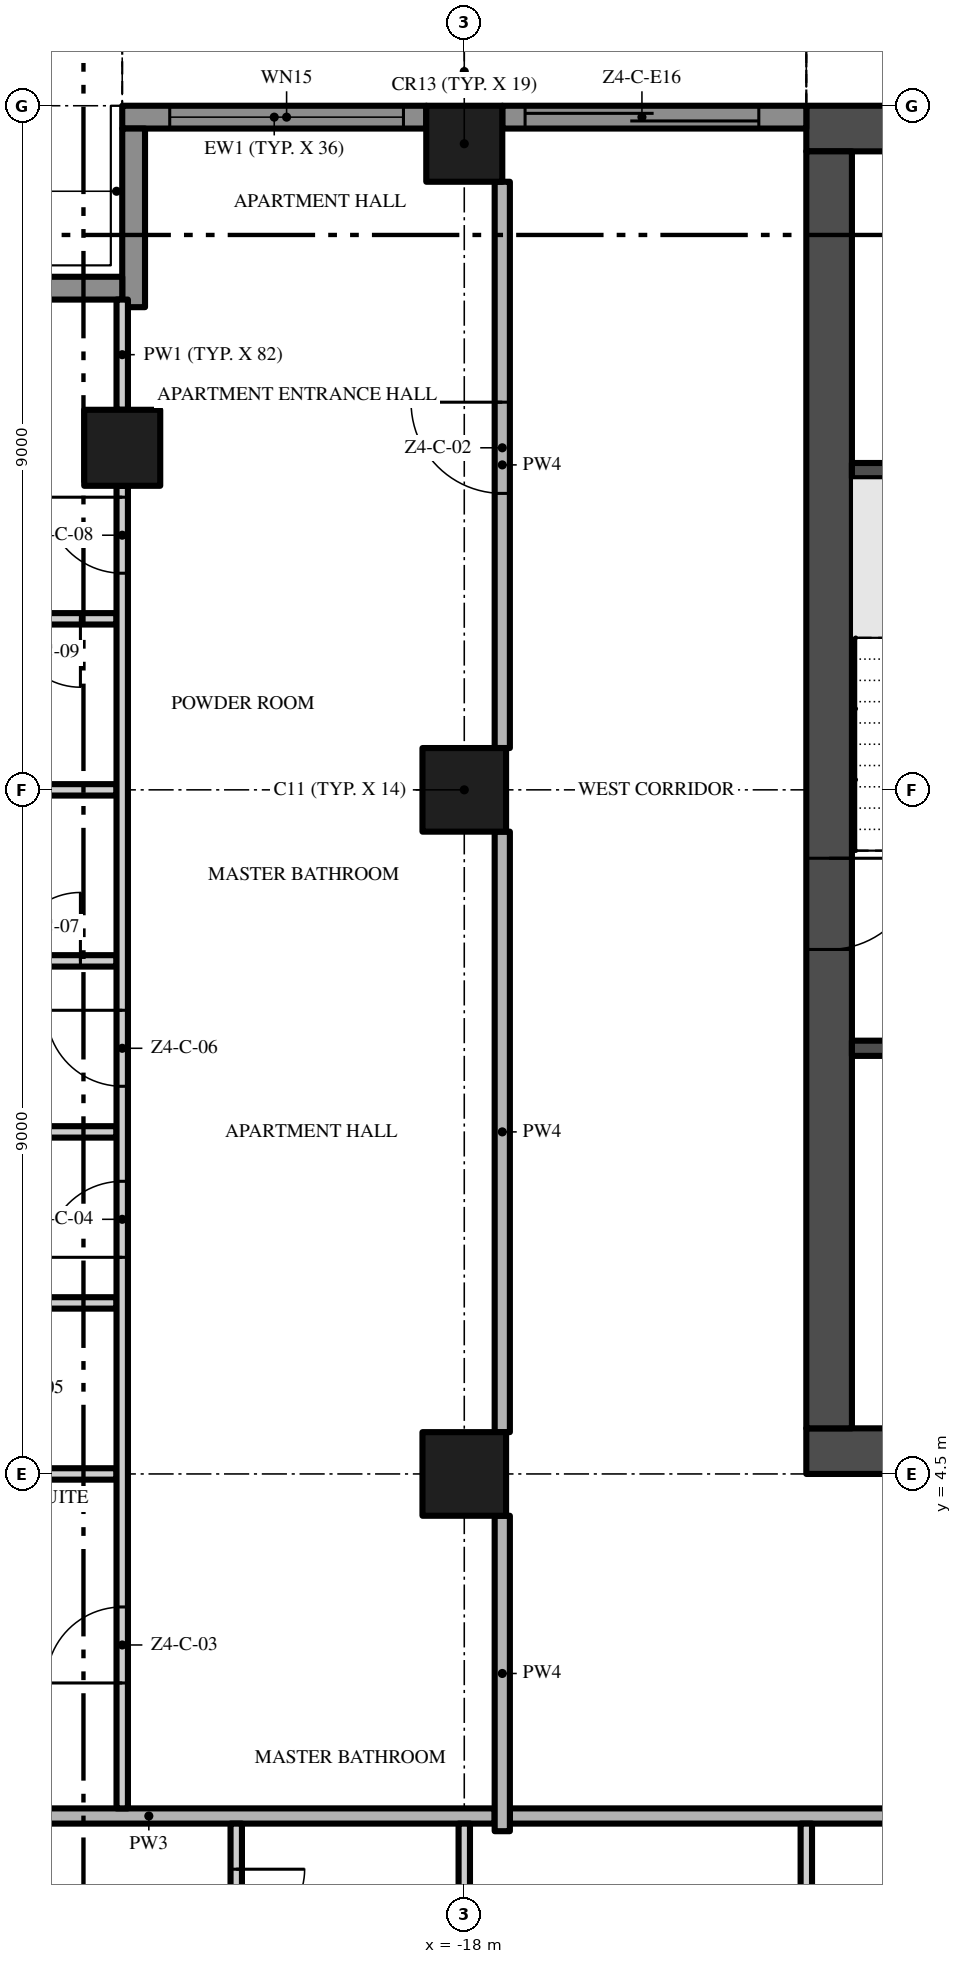
"""IFC4 building model, lengths in metres.
Left out: names, types, materials, properties, quantities, classifications, styles, units other than length and angle.
Written with IfcOpenShell. Run it as: python <this file> out.ifc"""

import sys

from ifc_helpers import new_model, si_unit, direction, frame, frame_2d, origin, origin_2d, place, context, subcontext, project, spatial, rectangle, extrude, element, fill, save


model = new_model("IFC4")
c1 = context("Model", 3, precision=1e-05, world=origin(), true_north=direction((0.0, 1.0)))
c2 = subcontext(c1, "Body", "Model", "MODEL_VIEW")
j1 = project(units=[si_unit("LENGTHUNIT", "METRE"), si_unit("PLANEANGLEUNIT", "RADIAN")], contexts=[c1])
p1 = place(None, origin())
s1 = spatial("IfcSite", under=j1, at=p1, CompositionType="ELEMENT")
p2 = place(p1, origin())
s2 = spatial("IfcBuilding", under=s1, at=p2, CompositionType="ELEMENT")
p3 = place(p2, frame((0.0, 0.0, 211.0)))
s3 = spatial("IfcBuildingStorey", under=s2, at=p3, CompositionType="ELEMENT", Elevation=211.0)
p4 = place(p3, frame((-13.5, 4.8, -0.3), z_axis=(0.0, 0.0, 1.0), x_axis=(1.0, 0.0, 0.0)))
e1 = element("IfcWall", 1, at=p4, inside=s3, PredefinedType="SHEAR", context=c2, shape_type="SweptSolid", body=[
    extrude(rectangle(XDim=27.0, YDim=0.6, at=frame_2d((13.5, 0.0))), origin(), (0.0, 0.0, 1.0), 3.8),
])
p5 = place(p4, frame((12.0, 0.0, 0.3)))
e2 = element("IfcOpeningElement", 2, at=p5, cuts=e1, PredefinedType="OPENING", context=c2, shape_type="SweptSolid", body=[
    extrude(rectangle(XDim=3.0, YDim=2.4, at=frame_2d((1.5, 1.2))), frame((0.0, 0.31, 0.0), z_axis=(0.0, -1.0, 0.0), x_axis=(1.0, 0.0, 0.0)), (0.0, 0.0, 1.0), 0.62),
])
p6 = place(p4, frame((4.9, 0.0, 0.3)))
e3 = element("IfcOpeningElement", 3, at=p6, cuts=e1, PredefinedType="OPENING", context=c2, shape_type="SweptSolid", body=[
    extrude(rectangle(XDim=1.2, YDim=2.2, at=frame_2d((0.6, 1.1))), frame((0.0, 0.31, 0.0), z_axis=(0.0, -1.0, 0.0), x_axis=(1.0, 0.0, 0.0)), (0.0, 0.0, 1.0), 0.62),
])
p7 = place(p4, frame((20.75, 0.0, 0.3)))
e4 = element("IfcOpeningElement", 4, at=p7, cuts=e1, PredefinedType="OPENING", context=c2, shape_type="SweptSolid", body=[
    extrude(rectangle(XDim=1.5, YDim=2.2, at=frame_2d((0.75, 1.1))), frame((0.0, 0.31, 0.0), z_axis=(0.0, -1.0, 0.0), x_axis=(1.0, 0.0, 0.0)), (0.0, 0.0, 1.0), 0.62),
])
p8 = place(p4, frame((17.4, 0.0, 0.3)))
e5 = element("IfcOpeningElement", 5, at=p8, cuts=e1, PredefinedType="OPENING", context=c2, shape_type="SweptSolid", body=[
    extrude(rectangle(XDim=1.2, YDim=2.2, at=frame_2d((0.6, 1.1))), frame((0.0, 0.31, 0.0), z_axis=(0.0, -1.0, 0.0), x_axis=(1.0, 0.0, 0.0)), (0.0, 0.0, 1.0), 0.62),
])
p9 = place(p3, frame((13.5, 22.2, -0.3), z_axis=(0.0, 0.0, 1.0), x_axis=(-1.0, 0.0, 0.0)))
e6 = element("IfcWall", 6, at=p9, inside=s3, PredefinedType="SHEAR", context=c2, shape_type="SweptSolid", body=[
    extrude(rectangle(XDim=27.0, YDim=0.6, at=frame_2d((13.5, 0.0))), origin(), (0.0, 0.0, 1.0), 3.8),
])
p10 = place(p3, frame((-13.2, 21.9, -0.3), z_axis=(0.0, 0.0, 1.0), x_axis=(0.0, -1.0, 0.0)))
e7 = element("IfcWall", 7, at=p10, inside=s3, PredefinedType="SHEAR", context=c2, shape_type="SweptSolid", body=[
    extrude(rectangle(XDim=16.8, YDim=0.6, at=frame_2d((8.4, 0.0))), origin(), (0.0, 0.0, 1.0), 3.8),
])
p11 = place(p10, frame((9.3, 0.0, 0.3)))
e8 = element("IfcOpeningElement", 8, at=p11, cuts=e7, PredefinedType="OPENING", context=c2, shape_type="SweptSolid", body=[
    extrude(rectangle(XDim=1.2, YDim=2.2, at=frame_2d((0.6, 1.1))), frame((0.0, 0.31, 0.0), z_axis=(0.0, -1.0, 0.0), x_axis=(1.0, 0.0, 0.0)), (0.0, 0.0, 1.0), 0.62),
])
p12 = place(p3, frame((-18.0, 13.5, 0.0), z_axis=(0.0, 0.0, 1.0), x_axis=(1.0, 0.0, 0.0)))
e9 = element("IfcColumn", 9, at=p12, inside=s3, PredefinedType="COLUMN", context=c2, shape_type="SweptSolid", body=[
    extrude(rectangle(XDim=1.1, YDim=1.1, at=origin_2d()), origin(), (0.0, 0.0, 1.0), 3.5),
])
p13 = place(p3, frame((-18.0, 22.0, 0.0), z_axis=(0.0, 0.0, 1.0), x_axis=(1.0, 0.0, 0.0)))
e10 = element("IfcColumn", 10, at=p13, inside=s3, PredefinedType="COLUMN", context=c2, shape_type="SweptSolid", body=[
    extrude(rectangle(XDim=1.0, YDim=1.0, at=origin_2d()), origin(), (0.0, 0.0, 1.0), 3.5),
])
p14 = place(p3, frame((-18.0, 4.5, 0.0), z_axis=(0.0, 0.0, 1.0), x_axis=(1.0, 0.0, 0.0)))
e11 = element("IfcColumn", 11, at=p14, inside=s3, PredefinedType="COLUMN", context=c2, shape_type="SweptSolid", body=[
    extrude(rectangle(XDim=1.1, YDim=1.1, at=origin_2d()), origin(), (0.0, 0.0, 1.0), 3.5),
])
p15 = place(p3, frame((-22.5, 18.0, 0.0), z_axis=(0.0, 0.0, 1.0), x_axis=(1.0, 0.0, 0.0)))
e12 = element("IfcColumn", 12, at=p15, inside=s3, PredefinedType="COLUMN", context=c2, shape_type="SweptSolid", body=[
    extrude(rectangle(XDim=1.0, YDim=1.0, at=origin_2d()), origin(), (0.0, 0.0, 1.0), 3.5),
])
p16 = place(p3, frame((-17.5, 22.35, 0.0), z_axis=(0.0, 0.0, 1.0), x_axis=(1.0, 0.0, 0.0)))
e13 = element("IfcWall", 13, at=p16, inside=s3, PredefinedType="SOLIDWALL", context=c2, shape_type="SweptSolid", body=[
    extrude(rectangle(XDim=4.0, YDim=0.3, at=frame_2d((2.0, 0.0))), origin(), (0.0, 0.0, 1.0), 3.5),
])
p17 = place(p16, frame((0.3, 0.0, 0.0)))
e14 = element("IfcOpeningElement", 14, at=p17, cuts=e13, PredefinedType="OPENING", context=c2, shape_type="SweptSolid", body=[
    extrude(rectangle(XDim=3.075, YDim=2.4, at=frame_2d((1.538, 1.2))), frame((0.0, 0.16, 0.0), z_axis=(0.0, -1.0, 0.0), x_axis=(1.0, 0.0, 0.0)), (0.0, 0.0, 1.0), 0.32),
])
p18 = place(p3, frame((-22.5, 22.35, 0.0), z_axis=(0.0, 0.0, 1.0), x_axis=(1.0, 0.0, 0.0)))
e15 = element("IfcWall", 15, at=p18, inside=s3, PredefinedType="SOLIDWALL", context=c2, shape_type="SweptSolid", body=[
    extrude(rectangle(XDim=4.0, YDim=0.3, at=frame_2d((2.0, 0.0))), origin(), (0.0, 0.0, 1.0), 3.5),
])
p19 = place(p18, frame((0.625, 0.0, 0.45)))
e16 = element("IfcOpeningElement", 16, at=p19, cuts=e15, PredefinedType="OPENING", context=c2, shape_type="SweptSolid", body=[
    extrude(rectangle(XDim=3.075, YDim=2.65, at=frame_2d((1.538, 1.325))), frame((0.0, 0.16, 0.0), z_axis=(0.0, -1.0, 0.0), x_axis=(1.0, 0.0, 0.0)), (0.0, 0.0, 1.0), 0.32),
])
p20 = place(p3, frame((-22.35, 19.85, 0.0), z_axis=(0.0, 0.0, 1.0), x_axis=(0.0, 1.0, 0.0)))
e17 = element("IfcWall", 17, at=p20, inside=s3, PredefinedType="SOLIDWALL", context=c2, shape_type="SweptSolid", body=[
    extrude(rectangle(XDim=2.35, YDim=0.3, at=frame_2d((1.175, 0.0))), origin(), (0.0, 0.0, 1.0), 3.5),
])
p21 = place(p3, frame((-24.75, 20.1, 0.0), z_axis=(0.0, 0.0, 1.0), x_axis=(1.0, 0.0, 0.0)))
e18 = element("IfcWall", 18, at=p21, inside=s3, PredefinedType="SOLIDWALL", context=c2, shape_type="SweptSolid", body=[
    extrude(rectangle(XDim=2.25, YDim=0.3, at=frame_2d((1.125, 0.0))), origin(), (0.0, 0.0, 1.0), 3.5),
])
for number, where, z_axis, x_axis in (
    (19, (-12.9, 10.1, 0.0), (0.0, 0.0, 1.0), (1.0, 0.0, 0.0)),
    (20, (-12.9, 17.7, 0.0), (0.0, 0.0, 1.0), (1.0, 0.0, 0.0)),
):
    element("IfcWall", number, at=place(p3, frame(where, z_axis=z_axis, x_axis=x_axis)), inside=s3, PredefinedType="SHEAR", context=c2, shape_type="SweptSolid", body=[
        extrude(rectangle(XDim=3.25, YDim=0.2, at=frame_2d((1.625, 0.0))), origin(), (0.0, 0.0, 1.0), 3.5),
    ])
p22 = place(p3, frame((-17.4, 0.0, 0.0), z_axis=(0.0, 0.0, 1.0), x_axis=(1.0, 0.0, 0.0)))
e21 = element("IfcWall", 21, at=p22, inside=s3, PredefinedType="PARTITIONING", context=c2, shape_type="SweptSolid", body=[
    extrude(rectangle(XDim=12.8, YDim=0.2, at=frame_2d((6.4, 0.0))), origin(), (0.0, 0.0, 1.0), 3.5),
])
p23 = place(p3, frame((-26.7, 0.0, 0.0), z_axis=(0.0, 0.0, 1.0), x_axis=(1.0, 0.0, 0.0)))
e22 = element("IfcWall", 22, at=p23, inside=s3, PredefinedType="PARTITIONING", context=c2, shape_type="SweptSolid", body=[
    extrude(rectangle(XDim=9.1, YDim=0.2, at=frame_2d((4.55, 0.0))), origin(), (0.0, 0.0, 1.0), 3.5),
])
p24 = place(p3, frame((-26.0, 4.5, 0.0), z_axis=(0.0, 0.0, 1.0), x_axis=(1.0, 0.0, 0.0)))
e23 = element("IfcWall", 23, at=p24, inside=s3, PredefinedType="PARTITIONING", context=c2, shape_type="SweptSolid", body=[
    extrude(rectangle(XDim=3.425, YDim=0.15, at=frame_2d((1.712, 0.0))), origin(), (0.0, 0.0, 1.0), 3.5),
])
p25 = place(p3, frame((-24.45, 6.75, 0.0), z_axis=(0.0, 0.0, 1.0), x_axis=(1.0, 0.0, 0.0)))
e24 = element("IfcWall", 24, at=p25, inside=s3, PredefinedType="PARTITIONING", context=c2, shape_type="SweptSolid", body=[
    extrude(rectangle(XDim=1.875, YDim=0.15, at=frame_2d((0.938, 0.0))), origin(), (0.0, 0.0, 1.0), 3.5),
])
p26 = place(p3, frame((-26.7, 9.0, 0.0), z_axis=(0.0, 0.0, 1.0), x_axis=(1.0, 0.0, 0.0)))
e25 = element("IfcWall", 25, at=p26, inside=s3, PredefinedType="PARTITIONING", context=c2, shape_type="SweptSolid", body=[
    extrude(rectangle(XDim=4.125, YDim=0.15, at=frame_2d((2.062, 0.0))), origin(), (0.0, 0.0, 1.0), 3.5),
])
p27 = place(p3, frame((-24.45, 11.25, 0.0), z_axis=(0.0, 0.0, 1.0), x_axis=(1.0, 0.0, 0.0)))
e26 = element("IfcWall", 26, at=p27, inside=s3, PredefinedType="PARTITIONING", context=c2, shape_type="SweptSolid", body=[
    extrude(rectangle(XDim=1.875, YDim=0.15, at=frame_2d((0.938, 0.0))), origin(), (0.0, 0.0, 1.0), 3.5),
])
p28 = place(p27, frame((0.5, 0.0, 0.0)))
e27 = element("IfcOpeningElement", 27, at=p28, cuts=e26, PredefinedType="OPENING", context=c2, shape_type="SweptSolid", body=[
    extrude(rectangle(XDim=0.9, YDim=2.1, at=frame_2d((0.45, 1.05))), frame((0.0, 0.085, 0.0), z_axis=(0.0, -1.0, 0.0), x_axis=(1.0, 0.0, 0.0)), (0.0, 0.0, 1.0), 0.17),
])
p29 = place(p3, frame((-24.45, 13.5, 0.0), z_axis=(0.0, 0.0, 1.0), x_axis=(1.0, 0.0, 0.0)))
e28 = element("IfcWall", 28, at=p29, inside=s3, PredefinedType="PARTITIONING", context=c2, shape_type="SweptSolid", body=[
    extrude(rectangle(XDim=1.875, YDim=0.15, at=frame_2d((0.938, 0.0))), origin(), (0.0, 0.0, 1.0), 3.5),
])
p30 = place(p3, frame((-22.575, 15.75, 0.0), z_axis=(0.0, 0.0, 1.0), x_axis=(-1.0, 0.0, 0.0)))
e29 = element("IfcWall", 29, at=p30, inside=s3, PredefinedType="PARTITIONING", context=c2, shape_type="SweptSolid", body=[
    extrude(rectangle(XDim=1.875, YDim=0.15, at=frame_2d((0.938, 0.0))), origin(), (0.0, 0.0, 1.0), 3.5),
])
p31 = place(p30, frame((0.475, 0.0, 0.0)))
e30 = element("IfcOpeningElement", 30, at=p31, cuts=e29, PredefinedType="OPENING", context=c2, shape_type="SweptSolid", body=[
    extrude(rectangle(XDim=0.9, YDim=2.1, at=frame_2d((0.45, 1.05))), frame((0.0, 0.085, 0.0), z_axis=(0.0, -1.0, 0.0), x_axis=(1.0, 0.0, 0.0)), (0.0, 0.0, 1.0), 0.17),
])
p32 = place(p3, frame((-22.5, 0.1, 0.0), z_axis=(0.0, 0.0, 1.0), x_axis=(0.0, 1.0, 0.0)))
e31 = element("IfcWall", 31, at=p32, inside=s3, PredefinedType="PARTITIONING", context=c2, shape_type="SweptSolid", body=[
    extrude(rectangle(XDim=17.4, YDim=0.15, at=frame_2d((8.7, 0.0))), origin(), (0.0, 0.0, 1.0), 3.5),
])
p33 = place(p32, frame((1.65, 0.0, 0.0)))
e32 = element("IfcOpeningElement", 32, at=p33, cuts=e31, PredefinedType="OPENING", context=c2, shape_type="SweptSolid", body=[
    extrude(rectangle(XDim=1.0, YDim=2.4, at=frame_2d((0.5, 1.2))), frame((0.0, 0.085, 0.0), z_axis=(0.0, -1.0, 0.0), x_axis=(1.0, 0.0, 0.0)), (0.0, 0.0, 1.0), 0.17),
])
p34 = place(p32, frame((7.25, 0.0, 0.0)))
e33 = element("IfcOpeningElement", 33, at=p34, cuts=e31, PredefinedType="OPENING", context=c2, shape_type="SweptSolid", body=[
    extrude(rectangle(XDim=1.0, YDim=2.4, at=frame_2d((0.5, 1.2))), frame((0.0, 0.085, 0.0), z_axis=(0.0, -1.0, 0.0), x_axis=(1.0, 0.0, 0.0)), (0.0, 0.0, 1.0), 0.17),
])
p35 = place(p32, frame((9.5, 0.0, 0.0)))
e34 = element("IfcOpeningElement", 34, at=p35, cuts=e31, PredefinedType="OPENING", context=c2, shape_type="SweptSolid", body=[
    extrude(rectangle(XDim=1.0, YDim=2.4, at=frame_2d((0.5, 1.2))), frame((0.0, 0.085, 0.0), z_axis=(0.0, -1.0, 0.0), x_axis=(1.0, 0.0, 0.0)), (0.0, 0.0, 1.0), 0.17),
])
p36 = place(p32, frame((16.25, 0.0, 0.0)))
e35 = element("IfcOpeningElement", 35, at=p36, cuts=e31, PredefinedType="OPENING", context=c2, shape_type="SweptSolid", body=[
    extrude(rectangle(XDim=1.0, YDim=2.4, at=frame_2d((0.5, 1.2))), frame((0.0, 0.085, 0.0), z_axis=(0.0, -1.0, 0.0), x_axis=(1.0, 0.0, 0.0)), (0.0, 0.0, 1.0), 0.17),
])
p37 = place(p3, frame((-22.5, 18.5, 0.0), z_axis=(0.0, 0.0, 1.0), x_axis=(0.0, 1.0, 0.0)))
e36 = element("IfcWall", 36, at=p37, inside=s3, PredefinedType="PARTITIONING", context=c2, shape_type="SweptSolid", body=[
    extrude(rectangle(XDim=1.45, YDim=0.15, at=frame_2d((0.725, 0.0))), origin(), (0.0, 0.0, 1.0), 3.5),
])
p38 = place(p3, frame((-21.0, -0.1, 0.0), z_axis=(0.0, 0.0, 1.0), x_axis=(0.0, -1.0, 0.0)))
e37 = element("IfcWall", 37, at=p38, inside=s3, PredefinedType="PARTITIONING", context=c2, shape_type="SweptSolid", body=[
    extrude(rectangle(XDim=2.225, YDim=0.15, at=frame_2d((1.113, 0.0))), origin(), (0.0, 0.0, 1.0), 3.5),
])
p39 = place(p38, frame((0.6, 0.0, 0.0)))
e38 = element("IfcOpeningElement", 38, at=p39, cuts=e37, PredefinedType="OPENING", context=c2, shape_type="SweptSolid", body=[
    extrude(rectangle(XDim=0.9, YDim=2.1, at=frame_2d((0.45, 1.05))), frame((0.0, 0.085, 0.0), z_axis=(0.0, -1.0, 0.0), x_axis=(1.0, 0.0, 0.0)), (0.0, 0.0, 1.0), 0.17),
])
p40 = place(p3, frame((-18.0, -3.95, 0.0), z_axis=(0.0, 0.0, 1.0), x_axis=(0.0, 1.0, 0.0)))
e39 = element("IfcWall", 39, at=p40, inside=s3, PredefinedType="PARTITIONING", context=c2, shape_type="SweptSolid", body=[
    extrude(rectangle(XDim=3.85, YDim=0.15, at=frame_2d((1.925, 0.0))), origin(), (0.0, 0.0, 1.0), 3.5),
])
p41 = place(p40, frame((0.15, 0.0, 0.0)))
e40 = element("IfcOpeningElement", 40, at=p41, cuts=e39, PredefinedType="OPENING", context=c2, shape_type="SweptSolid", body=[
    extrude(rectangle(XDim=1.0, YDim=2.4, at=frame_2d((0.5, 1.2))), frame((0.0, 0.085, 0.0), z_axis=(0.0, -1.0, 0.0), x_axis=(1.0, 0.0, 0.0)), (0.0, 0.0, 1.0), 0.17),
])
p42 = place(p3, frame((-17.5, -0.2, 0.0), z_axis=(0.0, 0.0, 1.0), x_axis=(0.0, 1.0, 0.0)))
e41 = element("IfcWall", 41, at=p42, inside=s3, PredefinedType="PARTITIONING", context=c2, shape_type="SweptSolid", body=[
    extrude(rectangle(XDim=4.15, YDim=0.2, at=frame_2d((2.075, 0.0))), origin(), (0.0, 0.0, 1.0), 3.5),
])
p43 = place(p3, frame((-17.5, 5.05, 0.0), z_axis=(0.0, 0.0, 1.0), x_axis=(0.0, 1.0, 0.0)))
e42 = element("IfcWall", 42, at=p43, inside=s3, PredefinedType="PARTITIONING", context=c2, shape_type="SweptSolid", body=[
    extrude(rectangle(XDim=7.9, YDim=0.2, at=frame_2d((3.95, 0.0))), origin(), (0.0, 0.0, 1.0), 3.5),
])
p44 = place(p3, frame((-17.5, 14.05, 0.0), z_axis=(0.0, 0.0, 1.0), x_axis=(0.0, 1.0, 0.0)))
e43 = element("IfcWall", 43, at=p44, inside=s3, PredefinedType="PARTITIONING", context=c2, shape_type="SweptSolid", body=[
    extrude(rectangle(XDim=7.45, YDim=0.2, at=frame_2d((3.725, 0.0))), origin(), (0.0, 0.0, 1.0), 3.5),
])
p45 = place(p44, frame((3.35, 0.0, 0.0)))
e44 = element("IfcOpeningElement", 44, at=p45, cuts=e43, PredefinedType="OPENING", context=c2, shape_type="SweptSolid", body=[
    extrude(rectangle(XDim=1.2, YDim=2.4, at=frame_2d((0.6, 1.2))), frame((0.0, 0.11, 0.0), z_axis=(0.0, -1.0, 0.0), x_axis=(1.0, 0.0, 0.0)), (0.0, 0.0, 1.0), 0.22),
])
p46 = place(p3, frame((-13.5, -8.325, 0.0), z_axis=(0.0, 0.0, 1.0), x_axis=(0.0, 1.0, 0.0)))
e45 = element("IfcWall", 45, at=p46, inside=s3, PredefinedType="PARTITIONING", context=c2, shape_type="SweptSolid", body=[
    extrude(rectangle(XDim=8.225, YDim=0.15, at=frame_2d((4.112, 0.0))), origin(), (0.0, 0.0, 1.0), 3.5),
])
p47 = place(p17, origin())
e46 = element("IfcDoor", 46, at=p47, inside=s3, OperationType="SINGLE_SWING_LEFT", PredefinedType="DOOR", context=c2, shape_type="SweptSolid", body=[
    extrude(rectangle(XDim=3.075, YDim=2.4, at=frame_2d((1.538, 1.2))), frame((0.0, 0.025, 0.0), z_axis=(0.0, -1.0, 0.0), x_axis=(1.0, 0.0, 0.0)), (0.0, 0.0, 1.0), 0.05),
])
fill(e14, e46)
p48 = place(p19, origin())
e47 = element("IfcWindow", 47, at=p48, inside=s3, PartitioningType="SINGLE_PANEL", PredefinedType="WINDOW", context=c2, shape_type="SweptSolid", body=[
    extrude(rectangle(XDim=3.075, YDim=2.65, at=frame_2d((1.538, 1.325))), frame((0.0, 0.03, 0.0), z_axis=(0.0, -1.0, 0.0), x_axis=(1.0, 0.0, 0.0)), (0.0, 0.0, 1.0), 0.06),
])
fill(e16, e47)
p49 = place(p11, frame((1.2, 0.0, 0.0), z_axis=(0.0, 0.0, 1.0), x_axis=(-1.0, 0.0, 0.0)))
e48 = element("IfcDoor", 48, at=p49, inside=s3, OperationType="SINGLE_SWING_RIGHT", PredefinedType="DOOR", context=c2, shape_type="SweptSolid", body=[
    extrude(rectangle(XDim=1.2, YDim=2.2, at=frame_2d((0.6, 1.1))), frame((0.0, 0.025, 0.0), z_axis=(0.0, -1.0, 0.0), x_axis=(1.0, 0.0, 0.0)), (0.0, 0.0, 1.0), 0.05),
])
fill(e8, e48)
p50 = place(p45, origin())
e49 = element("IfcDoor", 49, at=p50, inside=s3, OperationType="SINGLE_SWING_RIGHT", PredefinedType="DOOR", context=c2, shape_type="SweptSolid", body=[
    extrude(rectangle(XDim=1.2, YDim=2.4, at=frame_2d((0.6, 1.2))), frame((0.0, 0.025, 0.0), z_axis=(0.0, -1.0, 0.0), x_axis=(1.0, 0.0, 0.0)), (0.0, 0.0, 1.0), 0.05),
])
fill(e44, e49)
p51 = place(p33, origin())
e50 = element("IfcDoor", 50, at=p51, inside=s3, OperationType="SINGLE_SWING_LEFT", PredefinedType="DOOR", context=c2, shape_type="SweptSolid", body=[
    extrude(rectangle(XDim=1.0, YDim=2.4, at=frame_2d((0.5, 1.2))), frame((0.0, 0.025, 0.0), z_axis=(0.0, -1.0, 0.0), x_axis=(1.0, 0.0, 0.0)), (0.0, 0.0, 1.0), 0.05),
])
fill(e32, e50)
p52 = place(p34, origin())
e51 = element("IfcDoor", 51, at=p52, inside=s3, OperationType="SINGLE_SWING_LEFT", PredefinedType="DOOR", context=c2, shape_type="SweptSolid", body=[
    extrude(rectangle(XDim=1.0, YDim=2.4, at=frame_2d((0.5, 1.2))), frame((0.0, 0.025, 0.0), z_axis=(0.0, -1.0, 0.0), x_axis=(1.0, 0.0, 0.0)), (0.0, 0.0, 1.0), 0.05),
])
fill(e33, e51)
p53 = place(p35, origin())
e52 = element("IfcDoor", 52, at=p53, inside=s3, OperationType="SINGLE_SWING_RIGHT", PredefinedType="DOOR", context=c2, shape_type="SweptSolid", body=[
    extrude(rectangle(XDim=1.0, YDim=2.4, at=frame_2d((0.5, 1.2))), frame((0.0, 0.025, 0.0), z_axis=(0.0, -1.0, 0.0), x_axis=(1.0, 0.0, 0.0)), (0.0, 0.0, 1.0), 0.05),
])
fill(e34, e52)
p54 = place(p28, origin())
e53 = element("IfcDoor", 53, at=p54, inside=s3, OperationType="SINGLE_SWING_RIGHT", PredefinedType="DOOR", context=c2, shape_type="SweptSolid", body=[
    extrude(rectangle(XDim=0.9, YDim=2.1, at=frame_2d((0.45, 1.05))), frame((0.0, 0.025, 0.0), z_axis=(0.0, -1.0, 0.0), x_axis=(1.0, 0.0, 0.0)), (0.0, 0.0, 1.0), 0.05),
])
fill(e27, e53)
p55 = place(p36, origin())
e54 = element("IfcDoor", 54, at=p55, inside=s3, OperationType="SINGLE_SWING_RIGHT", PredefinedType="DOOR", context=c2, shape_type="SweptSolid", body=[
    extrude(rectangle(XDim=1.0, YDim=2.4, at=frame_2d((0.5, 1.2))), frame((0.0, 0.025, 0.0), z_axis=(0.0, -1.0, 0.0), x_axis=(1.0, 0.0, 0.0)), (0.0, 0.0, 1.0), 0.05),
])
fill(e35, e54)
p56 = place(p31, origin())
e55 = element("IfcDoor", 55, at=p56, inside=s3, OperationType="SINGLE_SWING_LEFT", PredefinedType="DOOR", context=c2, shape_type="SweptSolid", body=[
    extrude(rectangle(XDim=0.9, YDim=2.1, at=frame_2d((0.45, 1.05))), frame((0.0, 0.025, 0.0), z_axis=(0.0, -1.0, 0.0), x_axis=(1.0, 0.0, 0.0)), (0.0, 0.0, 1.0), 0.05),
])
fill(e30, e55)
p57 = place(p39, origin())
e56 = element("IfcDoor", 56, at=p57, inside=s3, OperationType="SINGLE_SWING_LEFT", PredefinedType="DOOR", context=c2, shape_type="SweptSolid", body=[
    extrude(rectangle(XDim=0.9, YDim=2.1, at=frame_2d((0.45, 1.05))), frame((0.0, 0.025, 0.0), z_axis=(0.0, -1.0, 0.0), x_axis=(1.0, 0.0, 0.0)), (0.0, 0.0, 1.0), 0.05),
])
fill(e38, e56)
save(model, sys.argv[1])
